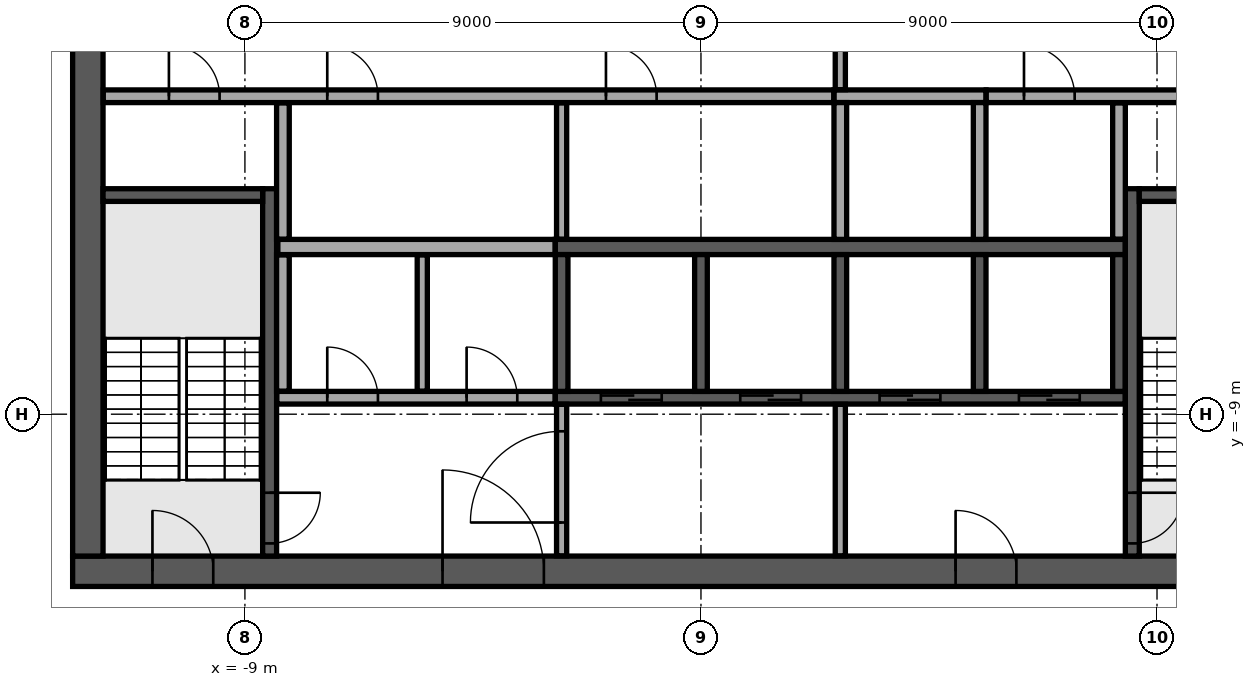
"""IFC4 building model, lengths in metres.
Left out: names, types, materials, properties, quantities, classifications, styles, units other than length and angle.
Written with IfcOpenShell. Run it as: python <this file> out.ifc"""

import sys

from ifc_helpers import new_model, si_unit, direction, frame, frame_2d, origin, place, context, subcontext, project, spatial, rectangle, extrude, element, fill, save


model = new_model("IFC4")
c1 = context("Model", 3, precision=1e-05, world=origin(), true_north=direction((0.0, 1.0)))
c2 = subcontext(c1, "Body", "Model", "MODEL_VIEW")
j1 = project(units=[si_unit("LENGTHUNIT", "METRE"), si_unit("PLANEANGLEUNIT", "RADIAN")], contexts=[c1])
p1 = place(None, origin())
s1 = spatial("IfcSite", under=j1, at=p1, CompositionType="ELEMENT")
p2 = place(p1, origin())
s2 = spatial("IfcBuilding", under=s1, at=p2, CompositionType="ELEMENT")
p3 = place(p2, frame((0.0, 0.0, 350.1)))
s3 = spatial("IfcBuildingStorey", under=s2, at=p3, CompositionType="ELEMENT", Elevation=350.1)
p4 = place(p3, frame((-12.4, -12.1, 0.0), z_axis=(0.0, 0.0, 1.0), x_axis=(1.0, 0.0, 0.0)))
e1 = element("IfcWall", 1, at=p4, inside=s3, PredefinedType="SHEAR", context=c2, shape_type="SweptSolid", body=[
    extrude(rectangle(XDim=24.8, YDim=0.6, at=frame_2d((12.4, 0.0))), origin(), (0.0, 0.0, 1.0), 7.7),
])
p5 = place(p4, frame((7.3, 0.0, 0.0)))
e2 = element("IfcOpeningElement", 2, at=p5, cuts=e1, PredefinedType="OPENING", context=c2, shape_type="SweptSolid", body=[
    extrude(rectangle(XDim=2.0, YDim=2.1, at=frame_2d((1.0, 1.05))), frame((0.0, 0.31, 0.0), z_axis=(0.0, -1.0, 0.0), x_axis=(1.0, 0.0, 0.0)), (0.0, 0.0, 1.0), 0.62),
])
p6 = place(p4, frame((17.425, 0.0, 0.0)))
e3 = element("IfcOpeningElement", 3, at=p6, cuts=e1, PredefinedType="OPENING", context=c2, shape_type="SweptSolid", body=[
    extrude(rectangle(XDim=1.2, YDim=2.1, at=frame_2d((0.6, 1.05))), frame((0.0, 0.31, 0.0), z_axis=(0.0, -1.0, 0.0), x_axis=(1.0, 0.0, 0.0)), (0.0, 0.0, 1.0), 0.62),
])
p7 = place(p4, frame((1.575, 0.0, 0.0)))
e4 = element("IfcOpeningElement", 4, at=p7, cuts=e1, PredefinedType="OPENING", context=c2, shape_type="SweptSolid", body=[
    extrude(rectangle(XDim=1.2, YDim=2.1, at=frame_2d((0.6, 1.05))), frame((0.0, 0.31, 0.0), z_axis=(0.0, -1.0, 0.0), x_axis=(1.0, 0.0, 0.0)), (0.0, 0.0, 1.0), 0.62),
])
p8 = place(p4, frame((22.025, 0.0, 0.0)))
e5 = element("IfcOpeningElement", 5, at=p8, cuts=e1, PredefinedType="OPENING", context=c2, shape_type="SweptSolid", body=[
    extrude(rectangle(XDim=1.2, YDim=2.1, at=frame_2d((0.6, 1.05))), frame((0.0, 0.31, 0.0), z_axis=(0.0, -1.0, 0.0), x_axis=(1.0, 0.0, 0.0)), (0.0, 0.0, 1.0), 0.62),
])
p9 = place(p3, frame((-12.1, -11.8, 0.0), z_axis=(0.0, 0.0, 1.0), x_axis=(0.0, 1.0, 0.0)))
e6 = element("IfcWall", 6, at=p9, inside=s3, PredefinedType="SHEAR", context=c2, shape_type="SweptSolid", body=[
    extrude(rectangle(XDim=23.6, YDim=0.6, at=frame_2d((11.8, 0.0))), origin(), (0.0, 0.0, 1.0), 7.7),
])
p10 = place(p9, frame((10.6, 0.0, 0.0)))
e7 = element("IfcOpeningElement", 7, at=p10, cuts=e6, PredefinedType="OPENING", context=c2, shape_type="SweptSolid", body=[
    extrude(rectangle(XDim=2.4, YDim=2.4, at=frame_2d((1.2, 1.2))), frame((0.0, 0.31, 0.0), z_axis=(0.0, -1.0, 0.0), x_axis=(1.0, 0.0, 0.0)), (0.0, 0.0, 1.0), 0.62),
])
p11 = place(p3, frame((-2.875, -5.7, 0.0), z_axis=(0.0, 0.0, 1.0), x_axis=(1.0, 0.0, 0.0)))
e8 = element("IfcWall", 8, at=p11, inside=s3, PredefinedType="SOLIDWALL", context=c2, shape_type="SweptSolid", body=[
    extrude(rectangle(XDim=11.25, YDim=0.3, at=frame_2d((5.625, 0.0))), origin(), (0.0, 0.0, 1.0), 7.7),
])
p12 = place(p3, frame((2.625, -2.725, 0.0), z_axis=(0.0, 0.0, 1.0), x_axis=(1.0, 0.0, 0.0)))
e9 = element("IfcWall", 9, at=p12, inside=s3, PredefinedType="SOLIDWALL", context=c2, shape_type="SweptSolid", body=[
    extrude(rectangle(XDim=3.0, YDim=0.25, at=frame_2d((1.5, 0.0))), origin(), (0.0, 0.0, 1.0), 7.7),
])
for number, where, z_axis, x_axis in (
    (10, (2.75, -5.55, 0.0), (0.0, 0.0, 1.0), (0.0, 1.0, 0.0)),
    (11, (5.5, -5.55, 0.0), (0.0, 0.0, 1.0), (0.0, 1.0, 0.0)),
):
    element("IfcWall", number, at=place(p3, frame(where, z_axis=z_axis, x_axis=x_axis)), inside=s3, PredefinedType="SOLIDWALL", context=c2, shape_type="SweptSolid", body=[
        extrude(rectangle(XDim=2.7, YDim=0.25, at=frame_2d((1.35, 0.0))), origin(), (0.0, 0.0, 1.0), 7.7),
    ])
p13 = place(p3, frame((-2.875, -8.675, 0.0), z_axis=(0.0, 0.0, 1.0), x_axis=(1.0, 0.0, 0.0)))
e12 = element("IfcWall", 12, at=p13, inside=s3, PredefinedType="SOLIDWALL", context=c2, shape_type="SweptSolid", body=[
    extrude(rectangle(XDim=11.25, YDim=0.25, at=frame_2d((5.625, 0.0))), origin(), (0.0, 0.0, 1.0), 7.7),
])
p14 = place(p13, frame((0.9, 0.0, 0.0)))
e13 = element("IfcOpeningElement", 13, at=p14, cuts=e12, PredefinedType="OPENING", context=c2, shape_type="SweptSolid", body=[
    extrude(rectangle(XDim=1.2, YDim=2.1, at=frame_2d((0.6, 1.05))), frame((0.0, 0.135, 0.0), z_axis=(0.0, -1.0, 0.0), x_axis=(1.0, 0.0, 0.0)), (0.0, 0.0, 1.0), 0.27),
])
p15 = place(p13, frame((3.65, 0.0, 0.0)))
e14 = element("IfcOpeningElement", 14, at=p15, cuts=e12, PredefinedType="OPENING", context=c2, shape_type="SweptSolid", body=[
    extrude(rectangle(XDim=1.2, YDim=2.1, at=frame_2d((0.6, 1.05))), frame((0.0, 0.135, 0.0), z_axis=(0.0, -1.0, 0.0), x_axis=(1.0, 0.0, 0.0)), (0.0, 0.0, 1.0), 0.27),
])
p16 = place(p13, frame((6.4, 0.0, 0.0)))
e15 = element("IfcOpeningElement", 15, at=p16, cuts=e12, PredefinedType="OPENING", context=c2, shape_type="SweptSolid", body=[
    extrude(rectangle(XDim=1.2, YDim=2.1, at=frame_2d((0.6, 1.05))), frame((0.0, 0.135, 0.0), z_axis=(0.0, -1.0, 0.0), x_axis=(1.0, 0.0, 0.0)), (0.0, 0.0, 1.0), 0.27),
])
p17 = place(p13, frame((9.15, 0.0, 0.0)))
e16 = element("IfcOpeningElement", 16, at=p17, cuts=e12, PredefinedType="OPENING", context=c2, shape_type="SweptSolid", body=[
    extrude(rectangle(XDim=1.2, YDim=2.1, at=frame_2d((0.6, 1.05))), frame((0.0, 0.135, 0.0), z_axis=(0.0, -1.0, 0.0), x_axis=(1.0, 0.0, 0.0)), (0.0, 0.0, 1.0), 0.27),
])
for number, where, z_axis, x_axis in (
    (17, (-2.75, -8.55, 0.0), (0.0, 0.0, 1.0), (0.0, 1.0, 0.0)),
    (18, (0.0, -8.55, 0.0), (0.0, 0.0, 1.0), (0.0, 1.0, 0.0)),
    (19, (2.75, -8.55, 0.0), (0.0, 0.0, 1.0), (0.0, 1.0, 0.0)),
    (20, (5.5, -8.55, 0.0), (0.0, 0.0, 1.0), (0.0, 1.0, 0.0)),
    (21, (8.25, -8.55, 0.0), (0.0, 0.0, 1.0), (0.0, 1.0, 0.0)),
):
    element("IfcWall", number, at=place(p3, frame(where, z_axis=z_axis, x_axis=x_axis)), inside=s3, PredefinedType="SOLIDWALL", context=c2, shape_type="SweptSolid", body=[
        extrude(rectangle(XDim=2.7, YDim=0.25, at=frame_2d((1.35, 0.0))), origin(), (0.0, 0.0, 1.0), 7.7),
    ])
p18 = place(p3, frame((-8.512, -4.55, 0.0), z_axis=(0.0, 0.0, 1.0), x_axis=(0.0, -1.0, 0.0)))
e22 = element("IfcWall", 22, at=p18, inside=s3, PredefinedType="SOLIDWALL", context=c2, shape_type="SweptSolid", body=[
    extrude(rectangle(XDim=7.25, YDim=0.275, at=frame_2d((3.625, 0.0))), origin(), (0.0, 0.0, 1.0), 7.7),
])
p19 = place(p18, frame((6.0, 0.0, 0.0)))
e23 = element("IfcOpeningElement", 23, at=p19, cuts=e22, PredefinedType="OPENING", context=c2, shape_type="SweptSolid", body=[
    extrude(rectangle(XDim=1.0, YDim=2.1, at=frame_2d((0.5, 1.05))), frame((0.0, 0.147, 0.0), z_axis=(0.0, -1.0, 0.0), x_axis=(1.0, 0.0, 0.0)), (0.0, 0.0, 1.0), 0.295),
])
p20 = place(p3, frame((-8.65, -4.675, 0.0), z_axis=(0.0, 0.0, 1.0), x_axis=(-1.0, 0.0, 0.0)))
e24 = element("IfcWall", 24, at=p20, inside=s3, PredefinedType="SOLIDWALL", context=c2, shape_type="SweptSolid", body=[
    extrude(rectangle(XDim=3.15, YDim=0.25, at=frame_2d((1.575, 0.0))), origin(), (0.0, 0.0, 1.0), 7.7),
])
p21 = place(p3, frame((8.512, -4.55, 0.0), z_axis=(0.0, 0.0, 1.0), x_axis=(0.0, -1.0, 0.0)))
e25 = element("IfcWall", 25, at=p21, inside=s3, PredefinedType="SOLIDWALL", context=c2, shape_type="SweptSolid", body=[
    extrude(rectangle(XDim=7.25, YDim=0.275, at=frame_2d((3.625, 0.0))), origin(), (0.0, 0.0, 1.0), 7.7),
])
p22 = place(p21, frame((6.0, 0.0, 0.0)))
e26 = element("IfcOpeningElement", 26, at=p22, cuts=e25, PredefinedType="OPENING", context=c2, shape_type="SweptSolid", body=[
    extrude(rectangle(XDim=1.0, YDim=2.1, at=frame_2d((0.5, 1.05))), frame((0.0, 0.147, 0.0), z_axis=(0.0, -1.0, 0.0), x_axis=(1.0, 0.0, 0.0)), (0.0, 0.0, 1.0), 0.295),
])
p23 = place(p3, frame((8.65, -4.675, 0.0), z_axis=(0.0, 0.0, 1.0), x_axis=(1.0, 0.0, 0.0)))
e27 = element("IfcWall", 27, at=p23, inside=s3, PredefinedType="SOLIDWALL", context=c2, shape_type="SweptSolid", body=[
    extrude(rectangle(XDim=3.15, YDim=0.25, at=frame_2d((1.575, 0.0))), origin(), (0.0, 0.0, 1.0), 7.7),
])
p24 = place(p3, frame((-2.75, -11.795, 0.0), z_axis=(0.0, 0.0, 1.0), x_axis=(0.0, 1.0, 0.0)))
e28 = element("IfcWall", 28, at=p24, inside=s3, PredefinedType="PARTITIONING", context=c2, shape_type="SweptSolid", body=[
    extrude(rectangle(XDim=2.99, YDim=0.2, at=frame_2d((1.495, 0.0))), origin(), (0.0, 0.0, 1.0), 7.7),
])
p25 = place(p24, frame((0.657, 0.0, 0.0)))
e29 = element("IfcOpeningElement", 29, at=p25, cuts=e28, PredefinedType="OPENING", context=c2, shape_type="SweptSolid", body=[
    extrude(rectangle(XDim=1.8, YDim=2.1, at=frame_2d((0.9, 1.05))), frame((0.0, 0.11, 0.0), z_axis=(0.0, -1.0, 0.0), x_axis=(1.0, 0.0, 0.0)), (0.0, 0.0, 1.0), 0.22),
])
p26 = place(p3, frame((2.75, -11.795, 0.0), z_axis=(0.0, 0.0, 1.0), x_axis=(0.0, 1.0, 0.0)))
e30 = element("IfcWall", 30, at=p26, inside=s3, PredefinedType="PARTITIONING", context=c2, shape_type="SweptSolid", body=[
    extrude(rectangle(XDim=2.99, YDim=0.2, at=frame_2d((1.495, 0.0))), origin(), (0.0, 0.0, 1.0), 7.7),
])
p27 = place(p3, frame((-8.37, -8.675, 0.0), z_axis=(0.0, 0.0, 1.0), x_axis=(1.0, 0.0, 0.0)))
e31 = element("IfcWall", 31, at=p27, inside=s3, PredefinedType="PARTITIONING", context=c2, shape_type="SweptSolid", body=[
    extrude(rectangle(XDim=5.49, YDim=0.25, at=frame_2d((2.745, 0.0))), origin(), (0.0, 0.0, 1.0), 7.7),
])
p28 = place(p27, frame((0.995, 0.0, 0.0)))
e32 = element("IfcOpeningElement", 32, at=p28, cuts=e31, PredefinedType="OPENING", context=c2, shape_type="SweptSolid", body=[
    extrude(rectangle(XDim=1.0, YDim=2.1, at=frame_2d((0.5, 1.05))), frame((0.0, 0.135, 0.0), z_axis=(0.0, -1.0, 0.0), x_axis=(1.0, 0.0, 0.0)), (0.0, 0.0, 1.0), 0.27),
])
p29 = place(p27, frame((3.745, 0.0, 0.0)))
e33 = element("IfcOpeningElement", 33, at=p29, cuts=e31, PredefinedType="OPENING", context=c2, shape_type="SweptSolid", body=[
    extrude(rectangle(XDim=1.0, YDim=2.1, at=frame_2d((0.5, 1.05))), frame((0.0, 0.135, 0.0), z_axis=(0.0, -1.0, 0.0), x_axis=(1.0, 0.0, 0.0)), (0.0, 0.0, 1.0), 0.27),
])
p30 = place(p3, frame((-8.25, -8.545, 0.0), z_axis=(0.0, 0.0, 1.0), x_axis=(0.0, 1.0, 0.0)))
e34 = element("IfcWall", 34, at=p30, inside=s3, PredefinedType="PARTITIONING", context=c2, shape_type="SweptSolid", body=[
    extrude(rectangle(XDim=2.69, YDim=0.25, at=frame_2d((1.345, 0.0))), origin(), (0.0, 0.0, 1.0), 7.7),
])
p31 = place(p3, frame((-5.5, -8.545, 0.0), z_axis=(0.0, 0.0, 1.0), x_axis=(0.0, 1.0, 0.0)))
e35 = element("IfcWall", 35, at=p31, inside=s3, PredefinedType="PARTITIONING", context=c2, shape_type="SweptSolid", body=[
    extrude(rectangle(XDim=2.69, YDim=0.2, at=frame_2d((1.345, 0.0))), origin(), (0.0, 0.0, 1.0), 7.7),
])
p32 = place(p3, frame((-8.35, -5.7, 0.0), z_axis=(0.0, 0.0, 1.0), x_axis=(1.0, 0.0, 0.0)))
e36 = element("IfcWall", 36, at=p32, inside=s3, PredefinedType="PARTITIONING", context=c2, shape_type="SweptSolid", body=[
    extrude(rectangle(XDim=5.47, YDim=0.3, at=frame_2d((2.735, 0.0))), origin(), (0.0, 0.0, 1.0), 7.7),
])
p33 = place(p3, frame((-8.25, -5.545, 0.0), z_axis=(0.0, 0.0, 1.0), x_axis=(0.0, 1.0, 0.0)))
e37 = element("IfcWall", 37, at=p33, inside=s3, PredefinedType="PARTITIONING", context=c2, shape_type="SweptSolid", body=[
    extrude(rectangle(XDim=2.69, YDim=0.25, at=frame_2d((1.345, 0.0))), origin(), (0.0, 0.0, 1.0), 7.7),
])
p34 = place(p3, frame((-2.75, -5.545, 0.0), z_axis=(0.0, 0.0, 1.0), x_axis=(0.0, 1.0, 0.0)))
e38 = element("IfcWall", 38, at=p34, inside=s3, PredefinedType="PARTITIONING", context=c2, shape_type="SweptSolid", body=[
    extrude(rectangle(XDim=2.69, YDim=0.2, at=frame_2d((1.345, 0.0))), origin(), (0.0, 0.0, 1.0), 7.7),
])
p35 = place(p3, frame((8.25, -5.545, 0.0), z_axis=(0.0, 0.0, 1.0), x_axis=(0.0, 1.0, 0.0)))
e39 = element("IfcWall", 39, at=p35, inside=s3, PredefinedType="PARTITIONING", context=c2, shape_type="SweptSolid", body=[
    extrude(rectangle(XDim=2.69, YDim=0.25, at=frame_2d((1.345, 0.0))), origin(), (0.0, 0.0, 1.0), 7.7),
])
p36 = place(p3, frame((-11.795, -2.725, 0.0), z_axis=(0.0, 0.0, 1.0), x_axis=(1.0, 0.0, 0.0)))
e40 = element("IfcWall", 40, at=p36, inside=s3, PredefinedType="PARTITIONING", context=c2, shape_type="SweptSolid", body=[
    extrude(rectangle(XDim=14.415, YDim=0.25, at=frame_2d((7.208, 0.0))), origin(), (0.0, 0.0, 1.0), 7.7),
])
p37 = place(p36, frame((1.295, 0.0, 0.0)))
e41 = element("IfcOpeningElement", 41, at=p37, cuts=e40, PredefinedType="OPENING", context=c2, shape_type="SweptSolid", body=[
    extrude(rectangle(XDim=1.0, YDim=2.1, at=frame_2d((0.5, 1.05))), frame((0.0, 0.135, 0.0), z_axis=(0.0, -1.0, 0.0), x_axis=(1.0, 0.0, 0.0)), (0.0, 0.0, 1.0), 0.27),
])
p38 = place(p36, frame((4.42, 0.0, 0.0)))
e42 = element("IfcOpeningElement", 42, at=p38, cuts=e40, PredefinedType="OPENING", context=c2, shape_type="SweptSolid", body=[
    extrude(rectangle(XDim=1.0, YDim=2.1, at=frame_2d((0.5, 1.05))), frame((0.0, 0.135, 0.0), z_axis=(0.0, -1.0, 0.0), x_axis=(1.0, 0.0, 0.0)), (0.0, 0.0, 1.0), 0.27),
])
p39 = place(p36, frame((9.92, 0.0, 0.0)))
e43 = element("IfcOpeningElement", 43, at=p39, cuts=e40, PredefinedType="OPENING", context=c2, shape_type="SweptSolid", body=[
    extrude(rectangle(XDim=1.0, YDim=2.1, at=frame_2d((0.5, 1.05))), frame((0.0, 0.135, 0.0), z_axis=(0.0, -1.0, 0.0), x_axis=(1.0, 0.0, 0.0)), (0.0, 0.0, 1.0), 0.27),
])
p40 = place(p3, frame((5.63, -2.725, 0.0), z_axis=(0.0, 0.0, 1.0), x_axis=(1.0, 0.0, 0.0)))
e44 = element("IfcWall", 44, at=p40, inside=s3, PredefinedType="PARTITIONING", context=c2, shape_type="SweptSolid", body=[
    extrude(rectangle(XDim=6.165, YDim=0.25, at=frame_2d((3.083, 0.0))), origin(), (0.0, 0.0, 1.0), 7.7),
])
p41 = place(p40, frame((0.745, 0.0, 0.0)))
e45 = element("IfcOpeningElement", 45, at=p41, cuts=e44, PredefinedType="OPENING", context=c2, shape_type="SweptSolid", body=[
    extrude(rectangle(XDim=1.0, YDim=2.1, at=frame_2d((0.5, 1.05))), frame((0.0, 0.135, 0.0), z_axis=(0.0, -1.0, 0.0), x_axis=(1.0, 0.0, 0.0)), (0.0, 0.0, 1.0), 0.27),
])
p42 = place(p40, frame((3.92, 0.0, 0.0)))
e46 = element("IfcOpeningElement", 46, at=p42, cuts=e44, PredefinedType="OPENING", context=c2, shape_type="SweptSolid", body=[
    extrude(rectangle(XDim=0.9, YDim=2.1, at=frame_2d((0.45, 1.05))), frame((0.0, 0.135, 0.0), z_axis=(0.0, -1.0, 0.0), x_axis=(1.0, 0.0, 0.0)), (0.0, 0.0, 1.0), 0.27),
])
p43 = place(p3, frame((2.75, -2.595, 0.0), z_axis=(0.0, 0.0, 1.0), x_axis=(0.0, 1.0, 0.0)))
e47 = element("IfcWall", 47, at=p43, inside=s3, PredefinedType="PARTITIONING", context=c2, shape_type="SweptSolid", body=[
    extrude(rectangle(XDim=5.19, YDim=0.2, at=frame_2d((2.595, 0.0))), origin(), (0.0, 0.0, 1.0), 7.7),
])
p44 = place(p43, frame((1.395, 0.0, 0.0)))
e48 = element("IfcOpeningElement", 48, at=p44, cuts=e47, PredefinedType="OPENING", context=c2, shape_type="SweptSolid", body=[
    extrude(rectangle(XDim=2.4, YDim=2.4, at=frame_2d((1.2, 1.2))), frame((0.0, 0.11, 0.0), z_axis=(0.0, -1.0, 0.0), x_axis=(1.0, 0.0, 0.0)), (0.0, 0.0, 1.0), 0.22),
])
p45 = place(p5, origin())
e49 = element("IfcDoor", 49, at=p45, inside=s3, OperationType="SINGLE_SWING_LEFT", PredefinedType="DOOR", context=c2, shape_type="SweptSolid", body=[
    extrude(rectangle(XDim=2.0, YDim=2.1, at=frame_2d((1.0, 1.05))), frame((0.0, 0.025, 0.0), z_axis=(0.0, -1.0, 0.0), x_axis=(1.0, 0.0, 0.0)), (0.0, 0.0, 1.0), 0.05),
])
fill(e2, e49)
p46 = place(p6, origin())
e50 = element("IfcDoor", 50, at=p46, inside=s3, OperationType="SINGLE_SWING_LEFT", PredefinedType="DOOR", context=c2, shape_type="SweptSolid", body=[
    extrude(rectangle(XDim=1.2, YDim=2.1, at=frame_2d((0.6, 1.05))), frame((0.0, 0.025, 0.0), z_axis=(0.0, -1.0, 0.0), x_axis=(1.0, 0.0, 0.0)), (0.0, 0.0, 1.0), 0.05),
])
fill(e3, e50)
p47 = place(p7, origin())
e51 = element("IfcDoor", 51, at=p47, inside=s3, OperationType="SINGLE_SWING_LEFT", PredefinedType="DOOR", context=c2, shape_type="SweptSolid", body=[
    extrude(rectangle(XDim=1.2, YDim=2.1, at=frame_2d((0.6, 1.05))), frame((0.0, 0.025, 0.0), z_axis=(0.0, -1.0, 0.0), x_axis=(1.0, 0.0, 0.0)), (0.0, 0.0, 1.0), 0.05),
])
fill(e4, e51)
p48 = place(p14, origin())
e52 = element("IfcDoor", 52, at=p48, inside=s3, OperationType="DOUBLE_DOOR_SLIDING", PredefinedType="DOOR", context=c2, shape_type="SweptSolid", body=[
    extrude(rectangle(XDim=1.2, YDim=2.1, at=frame_2d((0.6, 1.05))), frame((0.0, 0.025, 0.0), z_axis=(0.0, -1.0, 0.0), x_axis=(1.0, 0.0, 0.0)), (0.0, 0.0, 1.0), 0.05),
])
fill(e13, e52)
p49 = place(p15, origin())
e53 = element("IfcDoor", 53, at=p49, inside=s3, OperationType="DOUBLE_DOOR_SLIDING", PredefinedType="DOOR", context=c2, shape_type="SweptSolid", body=[
    extrude(rectangle(XDim=1.2, YDim=2.1, at=frame_2d((0.6, 1.05))), frame((0.0, 0.025, 0.0), z_axis=(0.0, -1.0, 0.0), x_axis=(1.0, 0.0, 0.0)), (0.0, 0.0, 1.0), 0.05),
])
fill(e14, e53)
p50 = place(p16, origin())
e54 = element("IfcDoor", 54, at=p50, inside=s3, OperationType="DOUBLE_DOOR_SLIDING", PredefinedType="DOOR", context=c2, shape_type="SweptSolid", body=[
    extrude(rectangle(XDim=1.2, YDim=2.1, at=frame_2d((0.6, 1.05))), frame((0.0, 0.025, 0.0), z_axis=(0.0, -1.0, 0.0), x_axis=(1.0, 0.0, 0.0)), (0.0, 0.0, 1.0), 0.05),
])
fill(e15, e54)
p51 = place(p17, origin())
e55 = element("IfcDoor", 55, at=p51, inside=s3, OperationType="DOUBLE_DOOR_SLIDING", PredefinedType="DOOR", context=c2, shape_type="SweptSolid", body=[
    extrude(rectangle(XDim=1.2, YDim=2.1, at=frame_2d((0.6, 1.05))), frame((0.0, 0.025, 0.0), z_axis=(0.0, -1.0, 0.0), x_axis=(1.0, 0.0, 0.0)), (0.0, 0.0, 1.0), 0.05),
])
fill(e16, e55)
p52 = place(p19, origin())
e56 = element("IfcDoor", 56, at=p52, inside=s3, OperationType="SINGLE_SWING_LEFT", PredefinedType="DOOR", context=c2, shape_type="SweptSolid", body=[
    extrude(rectangle(XDim=1.0, YDim=2.1, at=frame_2d((0.5, 1.05))), frame((0.0, 0.025, 0.0), z_axis=(0.0, -1.0, 0.0), x_axis=(1.0, 0.0, 0.0)), (0.0, 0.0, 1.0), 0.05),
])
fill(e23, e56)
p53 = place(p22, origin())
e57 = element("IfcDoor", 57, at=p53, inside=s3, OperationType="SINGLE_SWING_LEFT", PredefinedType="DOOR", context=c2, shape_type="SweptSolid", body=[
    extrude(rectangle(XDim=1.0, YDim=2.1, at=frame_2d((0.5, 1.05))), frame((0.0, 0.025, 0.0), z_axis=(0.0, -1.0, 0.0), x_axis=(1.0, 0.0, 0.0)), (0.0, 0.0, 1.0), 0.05),
])
fill(e26, e57)
p54 = place(p28, origin())
e58 = element("IfcDoor", 58, at=p54, inside=s3, OperationType="SINGLE_SWING_RIGHT", PredefinedType="DOOR", context=c2, shape_type="SweptSolid", body=[
    extrude(rectangle(XDim=1.0, YDim=2.1, at=frame_2d((0.5, 1.05))), frame((0.0, 0.025, 0.0), z_axis=(0.0, -1.0, 0.0), x_axis=(1.0, 0.0, 0.0)), (0.0, 0.0, 1.0), 0.05),
])
fill(e32, e58)
p55 = place(p29, origin())
e59 = element("IfcDoor", 59, at=p55, inside=s3, OperationType="SINGLE_SWING_RIGHT", PredefinedType="DOOR", context=c2, shape_type="SweptSolid", body=[
    extrude(rectangle(XDim=1.0, YDim=2.1, at=frame_2d((0.5, 1.05))), frame((0.0, 0.025, 0.0), z_axis=(0.0, -1.0, 0.0), x_axis=(1.0, 0.0, 0.0)), (0.0, 0.0, 1.0), 0.05),
])
fill(e33, e59)
p56 = place(p37, origin())
e60 = element("IfcDoor", 60, at=p56, inside=s3, OperationType="SINGLE_SWING_RIGHT", PredefinedType="DOOR", context=c2, shape_type="SweptSolid", body=[
    extrude(rectangle(XDim=1.0, YDim=2.1, at=frame_2d((0.5, 1.05))), frame((0.0, 0.025, 0.0), z_axis=(0.0, -1.0, 0.0), x_axis=(1.0, 0.0, 0.0)), (0.0, 0.0, 1.0), 0.05),
])
fill(e41, e60)
p57 = place(p41, origin())
e61 = element("IfcDoor", 61, at=p57, inside=s3, OperationType="SINGLE_SWING_RIGHT", PredefinedType="DOOR", context=c2, shape_type="SweptSolid", body=[
    extrude(rectangle(XDim=1.0, YDim=2.1, at=frame_2d((0.5, 1.05))), frame((0.0, 0.025, 0.0), z_axis=(0.0, -1.0, 0.0), x_axis=(1.0, 0.0, 0.0)), (0.0, 0.0, 1.0), 0.05),
])
fill(e45, e61)
p58 = place(p38, origin())
e62 = element("IfcDoor", 62, at=p58, inside=s3, OperationType="SINGLE_SWING_RIGHT", PredefinedType="DOOR", context=c2, shape_type="SweptSolid", body=[
    extrude(rectangle(XDim=1.0, YDim=2.1, at=frame_2d((0.5, 1.05))), frame((0.0, 0.025, 0.0), z_axis=(0.0, -1.0, 0.0), x_axis=(1.0, 0.0, 0.0)), (0.0, 0.0, 1.0), 0.05),
])
fill(e42, e62)
p59 = place(p39, origin())
e63 = element("IfcDoor", 63, at=p59, inside=s3, OperationType="SINGLE_SWING_RIGHT", PredefinedType="DOOR", context=c2, shape_type="SweptSolid", body=[
    extrude(rectangle(XDim=1.0, YDim=2.1, at=frame_2d((0.5, 1.05))), frame((0.0, 0.025, 0.0), z_axis=(0.0, -1.0, 0.0), x_axis=(1.0, 0.0, 0.0)), (0.0, 0.0, 1.0), 0.05),
])
fill(e43, e63)
p60 = place(p25, origin())
e64 = element("IfcDoor", 64, at=p60, inside=s3, OperationType="SINGLE_SWING_LEFT", PredefinedType="DOOR", context=c2, shape_type="SweptSolid", body=[
    extrude(rectangle(XDim=1.8, YDim=2.1, at=frame_2d((0.9, 1.05))), frame((0.0, 0.025, 0.0), z_axis=(0.0, -1.0, 0.0), x_axis=(1.0, 0.0, 0.0)), (0.0, 0.0, 1.0), 0.05),
])
fill(e29, e64)
save(model, sys.argv[1])
